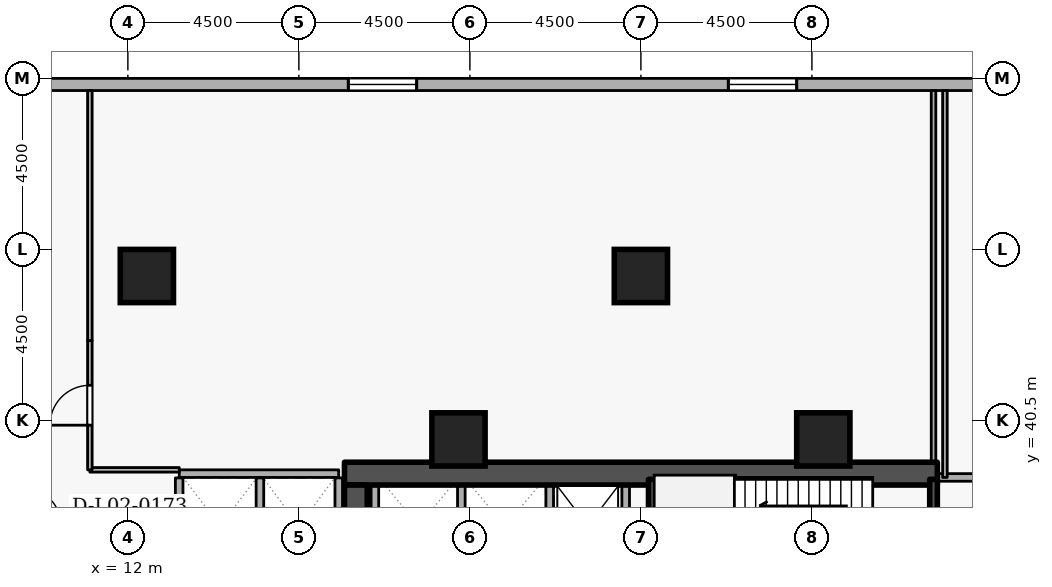
"""IFC4 building model, lengths in metres.
Left out: names, types, materials, properties, quantities, classifications, styles, units other than length and angle.
Written with IfcOpenShell. Run it as: python <this file> out.ifc"""

import sys

from ifc_helpers import new_model, si_unit, direction, frame, frame_2d, origin, origin_2d, place, context, subcontext, project, spatial, rectangle, extrude, element, fill, save


model = new_model("IFC4")
c1 = context("Model", 3, precision=1e-05, world=origin(), true_north=direction((0.0, 1.0)))
c2 = subcontext(c1, "Body", "Model", "MODEL_VIEW")
j1 = project(units=[si_unit("LENGTHUNIT", "METRE"), si_unit("PLANEANGLEUNIT", "RADIAN")], contexts=[c1])
p1 = place(None, origin())
s1 = spatial("IfcSite", under=j1, at=p1, CompositionType="ELEMENT")
p2 = place(p1, origin())
s2 = spatial("IfcBuilding", under=s1, at=p2, CompositionType="ELEMENT")
p3 = place(p2, frame((0.0, 0.0, 9.6)))
s3 = spatial("IfcBuildingStorey", under=s2, at=p3, CompositionType="ELEMENT", Elevation=9.6)
p4 = place(p3, frame((17.7, 39.1, 0.0), z_axis=(0.0, 0.0, 1.0), x_axis=(1.0, 0.0, 0.0)))
e1 = element("IfcWall", 1, at=p4, inside=s3, PredefinedType="SHEAR", context=c2, shape_type="SweptSolid", body=[
    extrude(rectangle(XDim=15.6, YDim=0.6, at=frame_2d((7.8, 0.0))), origin(), (0.0, 0.0, 1.0), 4.5),
])
p5 = place(p3, frame((18.0, 33.1, 0.0), z_axis=(0.0, 0.0, 1.0), x_axis=(0.0, 1.0, 0.0)))
e2 = element("IfcWall", 2, at=p5, inside=s3, PredefinedType="SHEAR", context=c2, shape_type="SweptSolid", body=[
    extrude(rectangle(XDim=5.7, YDim=0.6, at=frame_2d((2.85, 0.0))), origin(), (0.0, 0.0, 1.0), 4.5),
])
for number, where, z_axis, x_axis in (
    (3, (12.5, 44.3, 0.0), (0.0, 0.0, 1.0), (1.0, 0.0, 0.0)),
    (4, (25.5, 44.3, 0.0), (0.0, 0.0, 1.0), (1.0, 0.0, 0.0)),
    (5, (20.7, 40.0, 0.0), (0.0, 0.0, 1.0), (1.0, 0.0, 0.0)),
    (6, (30.3, 40.0, 0.0), (0.0, 0.0, 1.0), (1.0, 0.0, 0.0)),
):
    element("IfcColumn", number, at=place(p3, frame(where, z_axis=z_axis, x_axis=x_axis)), inside=s3, PredefinedType="COLUMN", context=c2, shape_type="SweptSolid", body=[
        extrude(rectangle(XDim=1.4, YDim=1.4, at=origin_2d()), origin(), (0.0, 0.0, 1.0), 4.5),
    ])
p6 = place(p3, frame((42.4, 49.34, 0.0), z_axis=(0.0, 0.0, 1.0), x_axis=(-1.0, 0.0, 0.0)))
e7 = element("IfcWall", 7, at=p6, inside=s3, PredefinedType="STANDARD", context=c2, shape_type="SweptSolid", body=[
    extrude(rectangle(XDim=39.4, YDim=0.32, at=frame_2d((19.7, 0.0))), origin(), (0.0, 0.0, 1.0), 3.56),
])
p7 = place(p6, frame((12.8, 0.0, 0.78)))
e8 = element("IfcOpeningElement", 8, at=p7, cuts=e7, PredefinedType="OPENING", context=c2, shape_type="SweptSolid", body=[
    extrude(rectangle(XDim=1.8, YDim=2.15, at=frame_2d((0.9, 1.075))), frame((0.0, 0.17, 0.0), z_axis=(0.0, -1.0, 0.0), x_axis=(1.0, 0.0, 0.0)), (0.0, 0.0, 1.0), 0.34),
])
p8 = place(p6, frame((22.8, 0.0, 0.78)))
e9 = element("IfcOpeningElement", 9, at=p8, cuts=e7, PredefinedType="OPENING", context=c2, shape_type="SweptSolid", body=[
    extrude(rectangle(XDim=1.8, YDim=2.15, at=frame_2d((0.9, 1.075))), frame((0.0, 0.17, 0.0), z_axis=(0.0, -1.0, 0.0), x_axis=(1.0, 0.0, 0.0)), (0.0, 0.0, 1.0), 0.34),
])
for number, where, z_axis, x_axis in (
    (10, (25.1, 36.352, 0.0), (0.0, 0.0, 1.0), (0.0, 1.0, 0.0)),
    (11, (23.1, 36.352, 0.0), (0.0, 0.0, 1.0), (0.0, 1.0, 0.0)),
    (12, (20.775, 36.352, 0.0), (0.0, 0.0, 1.0), (0.0, 1.0, 0.0)),
    (13, (18.5, 36.352, 0.0), (0.0, 0.0, 1.0), (0.0, 1.0, 0.0)),
):
    element("IfcWall", number, at=place(p3, frame(where, z_axis=z_axis, x_axis=x_axis)), inside=s3, PredefinedType="STANDARD", context=c2, shape_type="SweptSolid", body=[
        extrude(rectangle(XDim=2.436, YDim=0.2, at=frame_2d((1.218, 0.0))), origin(), (0.0, 0.0, 1.0), 4.16),
    ])
p9 = place(p3, frame((13.352, 39.1, 0.0), z_axis=(0.0, 0.0, 1.0), x_axis=(1.0, 0.0, 0.0)))
e14 = element("IfcWall", 14, at=p9, inside=s3, PredefinedType="STANDARD", context=c2, shape_type="SweptSolid", body=[
    extrude(rectangle(XDim=4.196, YDim=0.2, at=frame_2d((2.098, 0.0))), origin(), (0.0, 0.0, 1.0), 4.16),
])
p10 = place(p3, frame((17.55, 36.352, 0.0), z_axis=(0.0, 0.0, 1.0), x_axis=(0.0, 1.0, 0.0)))
e15 = element("IfcWall", 15, at=p10, inside=s3, PredefinedType="STANDARD", context=c2, shape_type="SweptSolid", body=[
    extrude(rectangle(XDim=2.636, YDim=0.2, at=frame_2d((1.318, 0.0))), origin(), (0.0, 0.0, 1.0), 3.365),
])
for number, where, z_axis, x_axis in (
    (16, (15.475, 36.352, 0.0), (0.0, 0.0, 1.0), (0.0, 1.0, 0.0)),
    (17, (13.35, 36.352, 0.0), (0.0, 0.0, 1.0), (0.0, 1.0, 0.0)),
):
    element("IfcWall", number, at=place(p3, frame(where, z_axis=z_axis, x_axis=x_axis)), inside=s3, PredefinedType="STANDARD", context=c2, shape_type="SweptSolid", body=[
        extrude(rectangle(XDim=2.636, YDim=0.2, at=frame_2d((1.318, 0.0))), origin(), (0.0, 0.0, 1.0), 4.16),
    ])
p11 = place(p3, frame((33.2, 38.95, 0.0), z_axis=(0.0, 0.0, 1.0), x_axis=(0.0, -1.0, 0.0)))
e18 = element("IfcWall", 18, at=p11, inside=s3, PredefinedType="SHEAR", context=c2, shape_type="SweptSolid", body=[
    extrude(rectangle(XDim=3.35, YDim=0.2, at=frame_2d((1.675, 0.0))), origin(), (0.0, 0.0, 1.0), 4.5),
])
p12 = place(p11, frame((1.125, 0.0, 0.0)))
e19 = element("IfcOpeningElement", 19, at=p12, cuts=e18, PredefinedType="OPENING", context=c2, shape_type="SweptSolid", body=[
    extrude(rectangle(XDim=1.1, YDim=2.1, at=frame_2d((0.55, 1.05))), frame((0.0, 0.11, 0.0), z_axis=(0.0, -1.0, 0.0), x_axis=(1.0, 0.0, 0.0)), (0.0, 0.0, 1.0), 0.22),
])
p13 = place(p3, frame((25.8, 35.6, 0.0), z_axis=(0.0, 0.0, 1.0), x_axis=(0.0, 1.0, 0.0)))
e20 = element("IfcWall", 20, at=p13, inside=s3, PredefinedType="SHEAR", context=c2, shape_type="SweptSolid", body=[
    extrude(rectangle(XDim=3.35, YDim=0.2, at=frame_2d((1.675, 0.0))), origin(), (0.0, 0.0, 1.0), 4.5),
])
p14 = place(p3, frame((35.8, 39.0, 0.0), z_axis=(0.0, 0.0, 1.0), x_axis=(-1.0, 0.0, 0.0)))
e21 = element("IfcWall", 21, at=p14, inside=s3, PredefinedType="STANDARD", context=c2, shape_type="SweptSolid", body=[
    extrude(rectangle(XDim=2.5, YDim=0.2, at=frame_2d((1.25, 0.0))), origin(), (0.0, 0.0, 1.0), 4.16),
])
p15 = place(p3, frame((33.5, 39.0, 0.0), z_axis=(0.0, 0.0, 1.0), x_axis=(0.0, 1.0, 0.0)))
e22 = element("IfcWall", 22, at=p15, inside=s3, PredefinedType="PARTITIONING", context=c2, shape_type="SweptSolid", body=[
    extrude(rectangle(XDim=10.18, YDim=0.12, at=frame_2d((5.09, 0.0))), origin(), (0.0, 0.0, 1.0), 4.16),
])
p16 = place(p3, frame((33.2, 49.18, 0.0), z_axis=(0.0, 0.0, 1.0), x_axis=(0.0, -1.0, 0.0)))
e23 = element("IfcWall", 23, at=p16, inside=s3, PredefinedType="PARTITIONING", context=c2, shape_type="SweptSolid", body=[
    extrude(rectangle(XDim=9.98, YDim=0.12, at=frame_2d((4.99, 0.0))), origin(), (0.0, 0.0, 1.0), 4.16),
])
p17 = place(p3, frame((13.352, 39.2, 0.0), z_axis=(0.0, 0.0, 1.0), x_axis=(-1.0, 0.0, 0.0)))
e24 = element("IfcWall", 24, at=p17, inside=s3, PredefinedType="PARTITIONING", context=c2, shape_type="SweptSolid", body=[
    extrude(rectangle(XDim=2.352, YDim=0.12, at=frame_2d((1.176, 0.0))), origin(), (0.0, 0.0, 1.0), 4.16),
])
p18 = place(p3, frame((11.0, 39.2, 0.0), z_axis=(0.0, 0.0, 1.0), x_axis=(0.0, 1.0, 0.0)))
e25 = element("IfcWall", 25, at=p18, inside=s3, PredefinedType="PARTITIONING", context=c2, shape_type="SweptSolid", body=[
    extrude(rectangle(XDim=3.4, YDim=0.12, at=frame_2d((1.7, 0.0))), origin(), (0.0, 0.0, 1.0), 4.16),
])
p19 = place(p18, frame((1.175, 0.0, 0.0)))
e26 = element("IfcOpeningElement", 26, at=p19, cuts=e25, PredefinedType="OPENING", context=c2, shape_type="SweptSolid", body=[
    extrude(rectangle(XDim=1.05, YDim=2.1, at=frame_2d((0.525, 1.05))), frame((0.0, 0.07, 0.0), z_axis=(0.0, -1.0, 0.0), x_axis=(1.0, 0.0, 0.0)), (0.0, 0.0, 1.0), 0.14),
])
p20 = place(p3, frame((11.0, 42.6, 0.0), z_axis=(0.0, 0.0, 1.0), x_axis=(0.0, 1.0, 0.0)))
e27 = element("IfcWall", 27, at=p20, inside=s3, PredefinedType="PARTITIONING", context=c2, shape_type="SweptSolid", body=[
    extrude(rectangle(XDim=6.58, YDim=0.12, at=frame_2d((3.29, 0.0))), origin(), (0.0, 0.0, 1.0), 4.16),
])
p21 = place(p7, origin())
e28 = element("IfcWindow", 28, at=p21, inside=s3, PartitioningType="SINGLE_PANEL", PredefinedType="WINDOW", context=c2, shape_type="SweptSolid", body=[
    extrude(rectangle(XDim=1.8, YDim=2.15, at=frame_2d((0.9, 1.075))), frame((0.0, 0.03, 0.0), z_axis=(0.0, -1.0, 0.0), x_axis=(1.0, 0.0, 0.0)), (0.0, 0.0, 1.0), 0.06),
])
fill(e8, e28)
p22 = place(p8, origin())
e29 = element("IfcWindow", 29, at=p22, inside=s3, PartitioningType="SINGLE_PANEL", PredefinedType="WINDOW", context=c2, shape_type="SweptSolid", body=[
    extrude(rectangle(XDim=1.8, YDim=2.15, at=frame_2d((0.9, 1.075))), frame((0.0, 0.03, 0.0), z_axis=(0.0, -1.0, 0.0), x_axis=(1.0, 0.0, 0.0)), (0.0, 0.0, 1.0), 0.06),
])
fill(e9, e29)
p23 = place(p19, origin())
e30 = element("IfcDoor", 30, at=p23, inside=s3, OperationType="SINGLE_SWING_LEFT", PredefinedType="DOOR", context=c2, shape_type="SweptSolid", body=[
    extrude(rectangle(XDim=1.05, YDim=2.1, at=frame_2d((0.525, 1.05))), frame((0.0, 0.025, 0.0), z_axis=(0.0, -1.0, 0.0), x_axis=(1.0, 0.0, 0.0)), (0.0, 0.0, 1.0), 0.05),
])
fill(e26, e30)
save(model, sys.argv[1])
